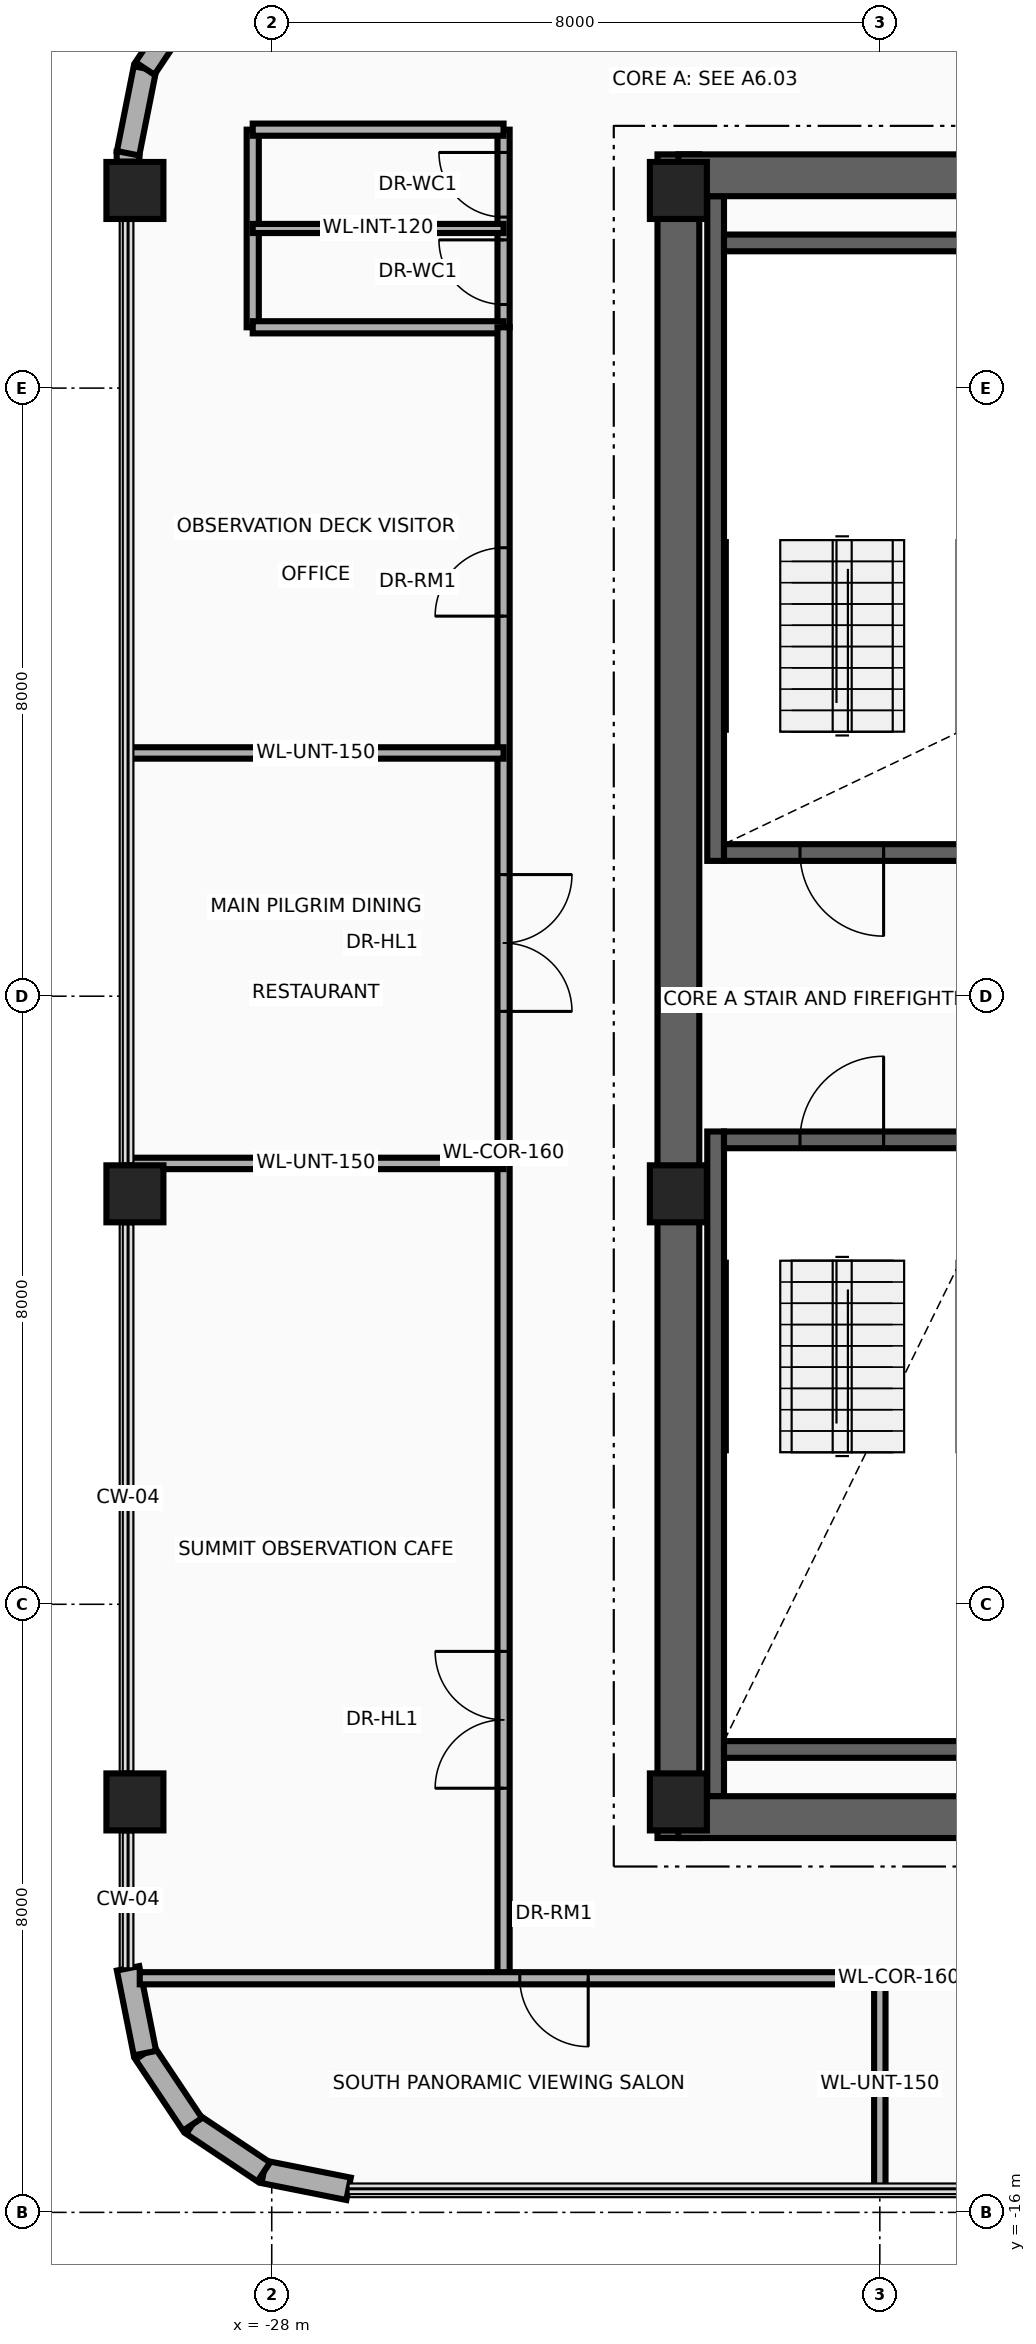
"""IFC4 building model, lengths in metres.
Left out: names, types, materials, properties, quantities, classifications, styles, units other than length and angle.
Written with IfcOpenShell. Run it as: python <this file> out.ifc"""

import sys

from ifc_helpers import new_model, si_unit, direction, frame, frame_2d, origin, origin_2d, place, context, subcontext, project, spatial, rectangle, extrude, source, transform, mapped, element, fill, save


model = new_model("IFC4")
c1 = context("Model", 3, precision=1e-05, world=origin(), true_north=direction((0.0, 1.0)))
c2 = subcontext(c1, "Body", "Model", "MODEL_VIEW")
j1 = project(units=[si_unit("LENGTHUNIT", "METRE"), si_unit("PLANEANGLEUNIT", "RADIAN")], contexts=[c1])
p1 = place(None, origin())
s1 = spatial("IfcSite", under=j1, at=p1, CompositionType="ELEMENT")
p2 = place(p1, origin())
s2 = spatial("IfcBuilding", under=s1, at=p2, CompositionType="ELEMENT")
p3 = place(p2, frame((0.0, 0.0, 290.6)))
s3 = spatial("IfcBuildingStorey", under=s2, at=p3, CompositionType="ELEMENT", Elevation=290.6)
p4 = place(p3, frame((-22.16, 1.78, 0.0), z_axis=(0.0, 0.0, 1.0), x_axis=(0.0, 1.0, 0.0)))
e1 = element("IfcWall", 1, at=p4, inside=s3, PredefinedType="SHEAR", context=c2, shape_type="SweptSolid", body=[
    extrude(rectangle(XDim=8.745, YDim=0.22, at=frame_2d((4.373, 0.0))), origin(), (0.0, 0.0, 1.0), 3.36),
])
p5 = place(p3, frame((-22.05, 1.89, 0.0), z_axis=(0.0, 0.0, 1.0), x_axis=(1.0, 0.0, 0.0)))
e2 = element("IfcWall", 2, at=p5, inside=s3, PredefinedType="SHEAR", context=c2, shape_type="SweptSolid", body=[
    extrude(rectangle(XDim=3.11, YDim=0.22, at=frame_2d((1.555, 0.0))), origin(), (0.0, 0.0, 1.0), 3.36),
])
p6 = place(p5, frame((1.0, 0.0, 0.0)))
e3 = element("IfcOpeningElement", 3, at=p6, cuts=e2, PredefinedType="OPENING", context=c2, shape_type="SweptSolid", body=[
    extrude(rectangle(XDim=1.1, YDim=2.15, at=frame_2d((0.55, 1.075))), frame((0.0, 0.125, 0.0), z_axis=(0.0, -1.0, 0.0), x_axis=(1.0, 0.0, 0.0)), (0.0, 0.0, 1.0), 0.25),
])
p7 = place(p3, frame((-22.05, 9.91, 0.0), z_axis=(0.0, 0.0, 1.0), x_axis=(1.0, 0.0, 0.0)))
e4 = element("IfcWall", 4, at=p7, inside=s3, PredefinedType="SHEAR", context=c2, shape_type="SweptSolid", body=[
    extrude(rectangle(XDim=3.11, YDim=0.22, at=frame_2d((1.555, 0.0))), origin(), (0.0, 0.0, 1.0), 3.36),
])
p8 = place(p3, frame((-22.16, -10.525, 0.0), z_axis=(0.0, 0.0, 1.0), x_axis=(0.0, 1.0, 0.0)))
e5 = element("IfcWall", 5, at=p8, inside=s3, PredefinedType="SHEAR", context=c2, shape_type="SweptSolid", body=[
    extrude(rectangle(XDim=8.745, YDim=0.22, at=frame_2d((4.373, 0.0))), origin(), (0.0, 0.0, 1.0), 3.36),
])
p9 = place(p3, frame((-22.05, -9.91, 0.0), z_axis=(0.0, 0.0, 1.0), x_axis=(1.0, 0.0, 0.0)))
e6 = element("IfcWall", 6, at=p9, inside=s3, PredefinedType="SHEAR", context=c2, shape_type="SweptSolid", body=[
    extrude(rectangle(XDim=3.11, YDim=0.22, at=frame_2d((1.555, 0.0))), origin(), (0.0, 0.0, 1.0), 3.36),
])
p10 = place(p3, frame((-22.05, -1.89, 0.0), z_axis=(0.0, 0.0, 1.0), x_axis=(1.0, 0.0, 0.0)))
e7 = element("IfcWall", 7, at=p10, inside=s3, PredefinedType="SHEAR", context=c2, shape_type="SweptSolid", body=[
    extrude(rectangle(XDim=3.11, YDim=0.22, at=frame_2d((1.555, 0.0))), origin(), (0.0, 0.0, 1.0), 3.36),
])
p11 = place(p10, frame((1.0, 0.0, 0.0)))
e8 = element("IfcOpeningElement", 8, at=p11, cuts=e7, PredefinedType="OPENING", context=c2, shape_type="SweptSolid", body=[
    extrude(rectangle(XDim=1.1, YDim=2.15, at=frame_2d((0.55, 1.075))), frame((0.0, 0.125, 0.0), z_axis=(0.0, -1.0, 0.0), x_axis=(1.0, 0.0, 0.0)), (0.0, 0.0, 1.0), 0.25),
])
p12 = place(p3, frame((-22.65, -11.075, 0.0), z_axis=(0.0, 0.0, 1.0), x_axis=(0.0, 1.0, 0.0)))
e9 = element("IfcWall", 9, at=p12, inside=s3, PredefinedType="SHEAR", context=c2, shape_type="SweptSolid", body=[
    extrude(rectangle(XDim=22.15, YDim=0.55, at=frame_2d((11.075, 0.0))), origin(), (0.0, 0.0, 1.0), 3.36),
])
for number, where, z_axis, x_axis in (
    (10, (-22.65, 10.8, 0.0), (0.0, 0.0, 1.0), (1.0, 0.0, 0.0)),
    (11, (-22.65, -10.8, 0.0), (0.0, 0.0, 1.0), (1.0, 0.0, 0.0)),
):
    element("IfcWall", number, at=place(p3, frame(where, z_axis=z_axis, x_axis=x_axis)), inside=s3, PredefinedType="SHEAR", context=c2, shape_type="SweptSolid", body=[
        extrude(rectangle(XDim=10.25, YDim=0.55, at=frame_2d((5.125, 0.0))), origin(), (0.0, 0.0, 1.0), 3.36),
    ])
m1 = source(origin(), c2, "Body", "SweptSolid", [
    extrude(rectangle(XDim=0.75, YDim=0.75, at=origin_2d()), origin(), (0.0, 0.0, 1.0), 3.6),
])
for number, where, z_axis, x_axis in (
    (12, (-29.8, -10.6, 0.0), (0.0, 0.0, 1.0), (1.0, 0.0, 0.0)),
    (13, (-22.65, -10.6, 0.0), (0.0, 0.0, 1.0), (1.0, 0.0, 0.0)),
    (14, (-29.8, -2.6, 0.0), (0.0, 0.0, 1.0), (1.0, 0.0, 0.0)),
    (15, (-22.65, -2.6, 0.0), (0.0, 0.0, 1.0), (1.0, 0.0, 0.0)),
    (16, (-29.8, 10.6, 0.0), (0.0, 0.0, 1.0), (1.0, 0.0, 0.0)),
    (17, (-22.65, 10.6, 0.0), (0.0, 0.0, 1.0), (1.0, 0.0, 0.0)),
):
    element("IfcColumn", number, at=place(p3, frame(where, z_axis=z_axis, x_axis=x_axis)), inside=s3, PredefinedType="COLUMN", context=c2, shape_type="MappedRepresentation", body=[
        mapped(m1, transform((0.0, 0.0, 0.0), x_axis=(1.0, 0.0, 0.0), y_axis=(0.0, 1.0, 0.0), z_axis=(0.0, 0.0, 1.0), scale=1.0)),
    ])
p13 = place(p3, frame((-29.89, 10.98, 0.0), z_axis=(0.0, 0.0, 1.0), x_axis=(0.0, 1.0, 0.0)))
e18 = element("IfcWall", 18, at=p13, inside=s3, PredefinedType="SOLIDWALL", context=c2, shape_type="SweptSolid", body=[
    extrude(rectangle(XDim=0.129, YDim=0.3, at=frame_2d((0.064, 0.0))), origin(), (0.0, 0.0, 1.0), 2.806),
])
p14 = place(p3, frame((-29.89, 11.089, 0.0), z_axis=(0.0, 0.0, 1.0), x_axis=(0.195043173023, 0.980794657743, 0.0)))
e19 = element("IfcWall", 19, at=p14, inside=s3, PredefinedType="SOLIDWALL", context=c2, shape_type="SweptSolid", body=[
    extrude(rectangle(XDim=1.138, YDim=0.3, at=frame_2d((0.569, 0.0))), origin(), (0.0, 0.0, 1.0), 2.806),
])
p15 = place(p3, frame((-29.668, 12.205, 0.0), z_axis=(0.0, 0.0, 1.0), x_axis=(0.555499891703, 0.831516608564, 0.0)))
e20 = element("IfcWall", 20, at=p15, inside=s3, PredefinedType="SOLIDWALL", context=c2, shape_type="SweptSolid", body=[
    extrude(rectangle(XDim=1.127, YDim=0.3, at=frame_2d((0.563, 0.0))), origin(), (0.0, 0.0, 1.0), 2.806),
])
p16 = place(p3, frame((-26.989, -15.69, 0.0), z_axis=(0.0, 0.0, 1.0), x_axis=(-0.980794657743, 0.195043173023, 0.0)))
e21 = element("IfcWall", 21, at=p16, inside=s3, PredefinedType="SOLIDWALL", context=c2, shape_type="SweptSolid", body=[
    extrude(rectangle(XDim=1.138, YDim=0.3, at=frame_2d((0.569, 0.0))), origin(), (0.0, 0.0, 1.0), 3.36),
])
for number, where, z_axis, x_axis in (
    (22, (-28.105, -15.468, 0.0), (0.0, 0.0, 1.0), (-0.831, 0.556, 0.0)),
    (23, (-29.042, -14.842, 0.0), (0.0, 0.0, 1.0), (-0.556, 0.831, 0.0)),
):
    element("IfcWall", number, at=place(p3, frame(where, z_axis=z_axis, x_axis=x_axis)), inside=s3, PredefinedType="SOLIDWALL", context=c2, shape_type="SweptSolid", body=[
        extrude(rectangle(XDim=1.127, YDim=0.3, at=frame_2d((0.563, 0.0))), origin(), (0.0, 0.0, 1.0), 3.36),
    ])
p17 = place(p3, frame((-29.668, -13.905, 0.0), z_axis=(0.0, 0.0, 1.0), x_axis=(-0.195043173023, 0.980794657743, 0.0)))
e24 = element("IfcWall", 24, at=p17, inside=s3, PredefinedType="SOLIDWALL", context=c2, shape_type="SweptSolid", body=[
    extrude(rectangle(XDim=1.138, YDim=0.3, at=frame_2d((0.569, 0.0))), origin(), (0.0, 0.0, 1.0), 3.36),
])
p18 = place(p3, frame((-28.25, 8.8, 0.0), z_axis=(0.0, 0.0, 1.0), x_axis=(0.0, 1.0, 0.0)))
e25 = element("IfcWall", 25, at=p18, inside=s3, PredefinedType="PARTITIONING", context=c2, shape_type="SweptSolid", body=[
    extrude(rectangle(XDim=2.6, YDim=0.16, at=frame_2d((1.3, 0.0))), origin(), (0.0, 0.0, 1.0), 2.723),
])
p19 = place(p3, frame((-24.95, 8.8, 0.0), z_axis=(0.0, 0.0, 1.0), x_axis=(0.0, 1.0, 0.0)))
e26 = element("IfcWall", 26, at=p19, inside=s3, PredefinedType="PARTITIONING", context=c2, shape_type="SweptSolid", body=[
    extrude(rectangle(XDim=2.6, YDim=0.16, at=frame_2d((1.3, 0.0))), origin(), (0.0, 0.0, 1.0), 2.723),
])
p20 = place(p19, frame((0.3, 0.0, 0.0)))
e27 = element("IfcOpeningElement", 27, at=p20, cuts=e26, PredefinedType="OPENING", context=c2, shape_type="SweptSolid", body=[
    extrude(rectangle(XDim=0.85, YDim=2.1, at=frame_2d((0.425, 1.05))), frame((0.0, 0.095, 0.0), z_axis=(0.0, -1.0, 0.0), x_axis=(1.0, 0.0, 0.0)), (0.0, 0.0, 1.0), 0.19),
])
p21 = place(p19, frame((1.45, 0.0, 0.0)))
e28 = element("IfcOpeningElement", 28, at=p21, cuts=e26, PredefinedType="OPENING", context=c2, shape_type="SweptSolid", body=[
    extrude(rectangle(XDim=0.85, YDim=2.1, at=frame_2d((0.425, 1.05))), frame((0.0, 0.095, 0.0), z_axis=(0.0, -1.0, 0.0), x_axis=(1.0, 0.0, 0.0)), (0.0, 0.0, 1.0), 0.19),
])
for number, where, z_axis, x_axis in (
    (29, (-28.25, 8.8, 0.0), (0.0, 0.0, 1.0), (1.0, 0.0, 0.0)),
    (30, (-28.25, 11.4, 0.0), (0.0, 0.0, 1.0), (1.0, 0.0, 0.0)),
):
    element("IfcWall", number, at=place(p3, frame(where, z_axis=z_axis, x_axis=x_axis)), inside=s3, PredefinedType="PARTITIONING", context=c2, shape_type="SweptSolid", body=[
        extrude(rectangle(XDim=3.3, YDim=0.16, at=frame_2d((1.65, 0.0))), origin(), (0.0, 0.0, 1.0), 3.36),
    ])
p22 = place(p3, frame((-28.25, 10.1, 0.0), z_axis=(0.0, 0.0, 1.0), x_axis=(1.0, 0.0, 0.0)))
e31 = element("IfcWall", 31, at=p22, inside=s3, PredefinedType="PARTITIONING", context=c2, shape_type="SweptSolid", body=[
    extrude(rectangle(XDim=3.3, YDim=0.12, at=frame_2d((1.65, 0.0))), origin(), (0.0, 0.0, 1.0), 3.36),
])
p23 = place(p3, frame((-24.95, -12.92, 0.0), z_axis=(0.0, 0.0, 1.0), x_axis=(0.0, 1.0, 0.0)))
e32 = element("IfcWall", 32, at=p23, inside=s3, PredefinedType="PARTITIONING", context=c2, shape_type="SweptSolid", body=[
    extrude(rectangle(XDim=21.72, YDim=0.16, at=frame_2d((10.86, 0.0))), origin(), (0.0, 0.0, 1.0), 2.723),
])
p24 = place(p23, frame((2.5, 0.0, 0.0)))
e33 = element("IfcOpeningElement", 33, at=p24, cuts=e32, PredefinedType="OPENING", context=c2, shape_type="SweptSolid", body=[
    extrude(rectangle(XDim=1.8, YDim=2.15, at=frame_2d((0.9, 1.075))), frame((0.0, 0.095, 0.0), z_axis=(0.0, -1.0, 0.0), x_axis=(1.0, 0.0, 0.0)), (0.0, 0.0, 1.0), 0.19),
])
p25 = place(p23, frame((12.72, 0.0, 0.0)))
e34 = element("IfcOpeningElement", 34, at=p25, cuts=e32, PredefinedType="OPENING", context=c2, shape_type="SweptSolid", body=[
    extrude(rectangle(XDim=1.8, YDim=2.15, at=frame_2d((0.9, 1.075))), frame((0.0, 0.095, 0.0), z_axis=(0.0, -1.0, 0.0), x_axis=(1.0, 0.0, 0.0)), (0.0, 0.0, 1.0), 0.19),
])
p26 = place(p23, frame((17.92, 0.0, 0.0)))
e35 = element("IfcOpeningElement", 35, at=p26, cuts=e32, PredefinedType="OPENING", context=c2, shape_type="SweptSolid", body=[
    extrude(rectangle(XDim=0.9, YDim=2.1, at=frame_2d((0.45, 1.05))), frame((0.0, 0.095, 0.0), z_axis=(0.0, -1.0, 0.0), x_axis=(1.0, 0.0, 0.0)), (0.0, 0.0, 1.0), 0.19),
])
for number, where, z_axis, x_axis in (
    (36, (-29.89, -2.2, 0.0), (0.0, 0.0, 1.0), (1.0, 0.0, 0.0)),
    (37, (-29.89, 3.2, 0.0), (0.0, 0.0, 1.0), (1.0, 0.0, 0.0)),
):
    element("IfcWall", number, at=place(p3, frame(where, z_axis=z_axis, x_axis=x_axis)), inside=s3, PredefinedType="PARTITIONING", context=c2, shape_type="SweptSolid", body=[
        extrude(rectangle(XDim=4.94, YDim=0.15, at=frame_2d((2.47, 0.0))), origin(), (0.0, 0.0, 1.0), 2.806),
    ])
p27 = place(p3, frame((-29.737, -12.92, 0.0), z_axis=(0.0, 0.0, 1.0), x_axis=(1.0, 0.0, 0.0)))
e38 = element("IfcWall", 38, at=p27, inside=s3, PredefinedType="PARTITIONING", context=c2, shape_type="SweptSolid", body=[
    extrude(rectangle(XDim=19.973, YDim=0.16, at=frame_2d((9.987, 0.0))), origin(), (0.0, 0.0, 1.0), 3.36),
])
p28 = place(p27, frame((5.0, 0.0, 0.0)))
e39 = element("IfcOpeningElement", 39, at=p28, cuts=e38, PredefinedType="OPENING", context=c2, shape_type="SweptSolid", body=[
    extrude(rectangle(XDim=0.9, YDim=2.1, at=frame_2d((0.45, 1.05))), frame((0.0, 0.095, 0.0), z_axis=(0.0, -1.0, 0.0), x_axis=(1.0, 0.0, 0.0)), (0.0, 0.0, 1.0), 0.19),
])
p29 = place(p27, frame((14.5, 0.0, 0.0)))
e40 = element("IfcOpeningElement", 40, at=p29, cuts=e38, PredefinedType="OPENING", context=c2, shape_type="SweptSolid", body=[
    extrude(rectangle(XDim=0.9, YDim=2.1, at=frame_2d((0.45, 1.05))), frame((0.0, 0.095, 0.0), z_axis=(0.0, -1.0, 0.0), x_axis=(1.0, 0.0, 0.0)), (0.0, 0.0, 1.0), 0.19),
])
p30 = place(p3, frame((-20.0, -15.69, 0.0), z_axis=(0.0, 0.0, 1.0), x_axis=(0.0, 1.0, 0.0)))
e41 = element("IfcWall", 41, at=p30, inside=s3, PredefinedType="PARTITIONING", context=c2, shape_type="SweptSolid", body=[
    extrude(rectangle(XDim=2.77, YDim=0.15, at=frame_2d((1.385, 0.0))), origin(), (0.0, 0.0, 1.0), 3.36),
])
p31 = place(p6, frame((1.1, 0.0, 0.0), z_axis=(0.0, 0.0, 1.0), x_axis=(-1.0, 0.0, 0.0)))
e42 = element("IfcDoor", 42, at=p31, inside=s3, OperationType="SINGLE_SWING_LEFT", PredefinedType="DOOR", context=c2, shape_type="SweptSolid", body=[
    extrude(rectangle(XDim=1.1, YDim=2.15, at=frame_2d((0.55, 1.075))), frame((0.0, 0.025, 0.0), z_axis=(0.0, -1.0, 0.0), x_axis=(1.0, 0.0, 0.0)), (0.0, 0.0, 1.0), 0.05),
])
fill(e3, e42)
p32 = place(p11, origin())
e43 = element("IfcDoor", 43, at=p32, inside=s3, OperationType="SINGLE_SWING_RIGHT", PredefinedType="DOOR", context=c2, shape_type="SweptSolid", body=[
    extrude(rectangle(XDim=1.1, YDim=2.15, at=frame_2d((0.55, 1.075))), frame((0.0, 0.025, 0.0), z_axis=(0.0, -1.0, 0.0), x_axis=(1.0, 0.0, 0.0)), (0.0, 0.0, 1.0), 0.05),
])
fill(e8, e43)
p33 = place(p20, origin())
e44 = element("IfcDoor", 44, at=p33, inside=s3, OperationType="SINGLE_SWING_RIGHT", PredefinedType="DOOR", context=c2, shape_type="SweptSolid", body=[
    extrude(rectangle(XDim=0.85, YDim=2.1, at=frame_2d((0.425, 1.05))), frame((0.0, 0.025, 0.0), z_axis=(0.0, -1.0, 0.0), x_axis=(1.0, 0.0, 0.0)), (0.0, 0.0, 1.0), 0.05),
])
fill(e27, e44)
p34 = place(p21, origin())
e45 = element("IfcDoor", 45, at=p34, inside=s3, OperationType="SINGLE_SWING_LEFT", PredefinedType="DOOR", context=c2, shape_type="SweptSolid", body=[
    extrude(rectangle(XDim=0.85, YDim=2.1, at=frame_2d((0.425, 1.05))), frame((0.0, 0.025, 0.0), z_axis=(0.0, -1.0, 0.0), x_axis=(1.0, 0.0, 0.0)), (0.0, 0.0, 1.0), 0.05),
])
fill(e28, e45)
p35 = place(p24, origin())
e46 = element("IfcDoor", 46, at=p35, inside=s3, OperationType="DOUBLE_DOOR_SINGLE_SWING", PredefinedType="DOOR", context=c2, shape_type="SweptSolid", body=[
    extrude(rectangle(XDim=1.8, YDim=2.15, at=frame_2d((0.9, 1.075))), frame((0.0, 0.025, 0.0), z_axis=(0.0, -1.0, 0.0), x_axis=(1.0, 0.0, 0.0)), (0.0, 0.0, 1.0), 0.05),
])
fill(e33, e46)
p36 = place(p25, frame((1.8, 0.0, 0.0), z_axis=(0.0, 0.0, 1.0), x_axis=(-1.0, 0.0, 0.0)))
e47 = element("IfcDoor", 47, at=p36, inside=s3, OperationType="DOUBLE_DOOR_SINGLE_SWING", PredefinedType="DOOR", context=c2, shape_type="SweptSolid", body=[
    extrude(rectangle(XDim=1.8, YDim=2.15, at=frame_2d((0.9, 1.075))), frame((0.0, 0.025, 0.0), z_axis=(0.0, -1.0, 0.0), x_axis=(1.0, 0.0, 0.0)), (0.0, 0.0, 1.0), 0.05),
])
fill(e34, e47)
p37 = place(p26, origin())
e48 = element("IfcDoor", 48, at=p37, inside=s3, OperationType="SINGLE_SWING_RIGHT", PredefinedType="DOOR", context=c2, shape_type="SweptSolid", body=[
    extrude(rectangle(XDim=0.9, YDim=2.1, at=frame_2d((0.45, 1.05))), frame((0.0, 0.025, 0.0), z_axis=(0.0, -1.0, 0.0), x_axis=(1.0, 0.0, 0.0)), (0.0, 0.0, 1.0), 0.05),
])
fill(e35, e48)
p38 = place(p28, frame((0.9, 0.0, 0.0), z_axis=(0.0, 0.0, 1.0), x_axis=(-1.0, 0.0, 0.0)))
e49 = element("IfcDoor", 49, at=p38, inside=s3, OperationType="SINGLE_SWING_LEFT", PredefinedType="DOOR", context=c2, shape_type="SweptSolid", body=[
    extrude(rectangle(XDim=0.9, YDim=2.1, at=frame_2d((0.45, 1.05))), frame((0.0, 0.025, 0.0), z_axis=(0.0, -1.0, 0.0), x_axis=(1.0, 0.0, 0.0)), (0.0, 0.0, 1.0), 0.05),
])
fill(e39, e49)
save(model, sys.argv[1])
